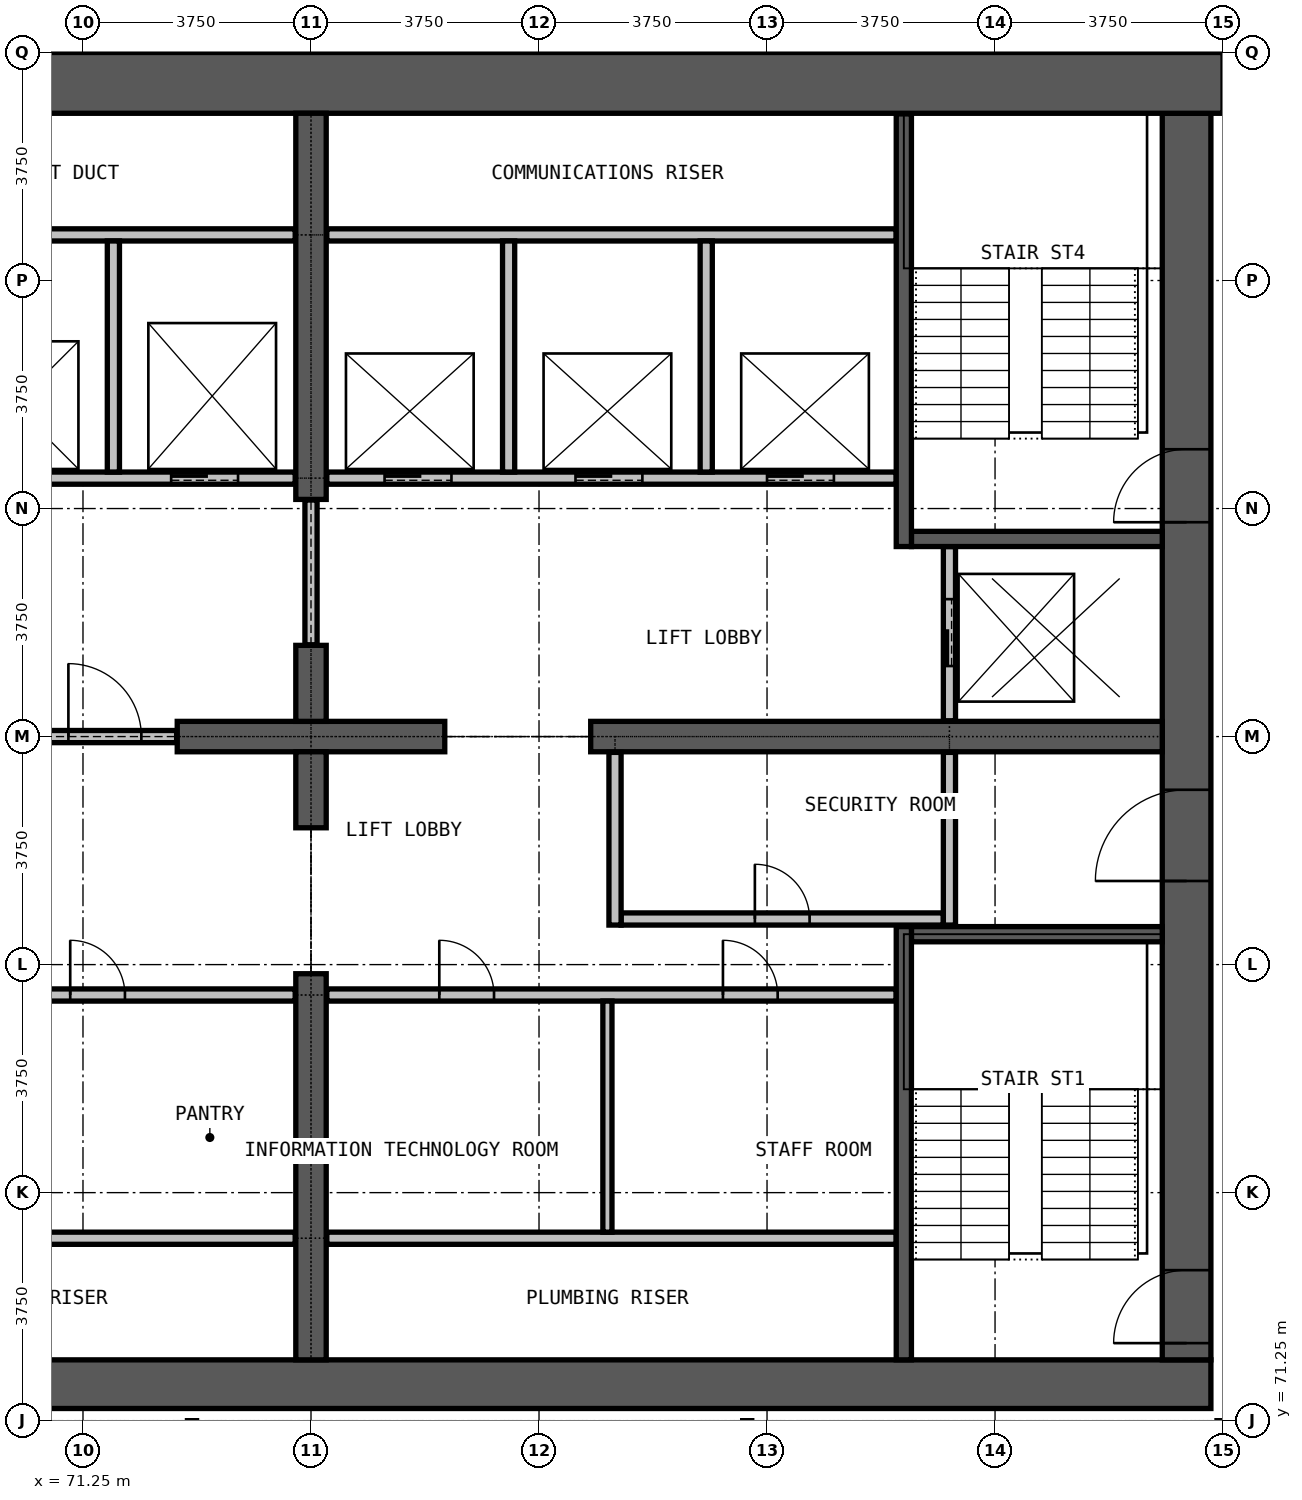
"""IFC4 building model, lengths in metres.
Left out: names, types, materials, properties, quantities, classifications, styles, units other than length and angle.
Written with IfcOpenShell. Run it as: python <this file> out.ifc"""

import sys

from ifc_helpers import new_model, si_unit, direction, frame, frame_2d, origin, place, context, subcontext, project, spatial, rectangle, extrude, element, fill, save


model = new_model("IFC4")
c1 = context("Model", 3, precision=1e-05, world=origin(), true_north=direction((0.0, 1.0)))
c2 = subcontext(c1, "Body", "Model", "MODEL_VIEW")
j1 = project(units=[si_unit("LENGTHUNIT", "METRE"), si_unit("PLANEANGLEUNIT", "RADIAN")], contexts=[c1])
p1 = place(None, origin())
s1 = spatial("IfcSite", under=j1, at=p1, CompositionType="ELEMENT")
p2 = place(p1, origin())
s2 = spatial("IfcBuilding", under=s1, at=p2, CompositionType="ELEMENT")
p3 = place(p2, frame((0.0, 0.0, 154.9)))
s3 = spatial("IfcBuildingStorey", under=s2, at=p3, CompositionType="ELEMENT", Elevation=154.9)
p4 = place(p3, frame((60.2, 71.85, 0.0), z_axis=(0.0, 0.0, 1.0), x_axis=(1.0, 0.0, 0.0)))
e1 = element("IfcWall", 1, at=p4, inside=s3, PredefinedType="SHEAR", context=c2, shape_type="SweptSolid", body=[
    extrude(rectangle(XDim=29.6, YDim=0.8, at=frame_2d((14.8, 0.0))), origin(), (0.0, 0.0, 1.0), 3.6),
])
p5 = place(p3, frame((89.4, 72.25, 0.0), z_axis=(0.0, 0.0, 1.0), x_axis=(0.0, 1.0, 0.0)))
e2 = element("IfcWall", 2, at=p5, inside=s3, PredefinedType="SHEAR", context=c2, shape_type="SweptSolid", body=[
    extrude(rectangle(XDim=20.5, YDim=0.8, at=frame_2d((10.25, 0.0))), origin(), (0.0, 0.0, 1.0), 3.6),
])
p6 = place(p5, frame((0.275, 0.0, 0.0)))
e3 = element("IfcOpeningElement", 3, at=p6, cuts=e2, PredefinedType="OPENING", context=c2, shape_type="SweptSolid", body=[
    extrude(rectangle(XDim=1.2, YDim=2.2, at=frame_2d((0.6, 1.1))), frame((0.0, 0.41, 0.0), z_axis=(0.0, -1.0, 0.0), x_axis=(1.0, 0.0, 0.0)), (0.0, 0.0, 1.0), 0.82),
])
p7 = place(p5, frame((13.775, 0.0, 0.0)))
e4 = element("IfcOpeningElement", 4, at=p7, cuts=e2, PredefinedType="OPENING", context=c2, shape_type="SweptSolid", body=[
    extrude(rectangle(XDim=1.2, YDim=2.2, at=frame_2d((0.6, 1.1))), frame((0.0, 0.41, 0.0), z_axis=(0.0, -1.0, 0.0), x_axis=(1.0, 0.0, 0.0)), (0.0, 0.0, 1.0), 0.82),
])
p8 = place(p5, frame((7.875, 0.0, 0.0)))
e5 = element("IfcOpeningElement", 5, at=p8, cuts=e2, PredefinedType="OPENING", context=c2, shape_type="SweptSolid", body=[
    extrude(rectangle(XDim=1.5, YDim=2.2, at=frame_2d((0.75, 1.1))), frame((0.0, 0.41, 0.0), z_axis=(0.0, -1.0, 0.0), x_axis=(1.0, 0.0, 0.0)), (0.0, 0.0, 1.0), 0.82),
])
p9 = place(p3, frame((90.0, 93.25, 0.0), z_axis=(0.0, 0.0, 1.0), x_axis=(-1.0, 0.0, 0.0)))
e6 = element("IfcWall", 6, at=p9, inside=s3, PredefinedType="SHEAR", context=c2, shape_type="SweptSolid", body=[
    extrude(rectangle(XDim=30.0, YDim=1.0, at=frame_2d((15.0, 0.0))), origin(), (0.0, 0.0, 1.0), 3.6),
])
p10 = place(p3, frame((72.8, 82.5, 0.0), z_axis=(0.0, 0.0, 1.0), x_axis=(1.0, 0.0, 0.0)))
e7 = element("IfcWall", 7, at=p10, inside=s3, PredefinedType="SHEAR", context=c2, shape_type="SweptSolid", body=[
    extrude(rectangle(XDim=4.4, YDim=0.5, at=frame_2d((2.2, 0.0))), origin(), (0.0, 0.0, 1.0), 3.6),
])
p11 = place(p3, frame((79.6, 82.5, 0.0), z_axis=(0.0, 0.0, 1.0), x_axis=(1.0, 0.0, 0.0)))
e8 = element("IfcWall", 8, at=p11, inside=s3, PredefinedType="SHEAR", context=c2, shape_type="SweptSolid", body=[
    extrude(rectangle(XDim=9.4, YDim=0.5, at=frame_2d((4.7, 0.0))), origin(), (0.0, 0.0, 1.0), 3.6),
])
p12 = place(p3, frame((75.0, 72.25, 0.0), z_axis=(0.0, 0.0, 1.0), x_axis=(0.0, 1.0, 0.0)))
e9 = element("IfcWall", 9, at=p12, inside=s3, PredefinedType="SHEAR", context=c2, shape_type="SweptSolid", body=[
    extrude(rectangle(XDim=6.35, YDim=0.5, at=frame_2d((3.175, 0.0))), origin(), (0.0, 0.0, 1.0), 3.6),
])
for number, where, z_axis, x_axis in (
    (10, (75.0, 81.0, 0.0), (0.0, 0.0, 1.0), (0.0, 1.0, 0.0)),
    (11, (75.0, 82.75, 0.0), (0.0, 0.0, 1.0), (0.0, 1.0, 0.0)),
):
    element("IfcWall", number, at=place(p3, frame(where, z_axis=z_axis, x_axis=x_axis)), inside=s3, PredefinedType="SHEAR", context=c2, shape_type="SweptSolid", body=[
        extrude(rectangle(XDim=1.25, YDim=0.5, at=frame_2d((0.625, 0.0))), origin(), (0.0, 0.0, 1.0), 3.6),
    ])
p13 = place(p3, frame((75.0, 86.4, 0.0), z_axis=(0.0, 0.0, 1.0), x_axis=(0.0, 1.0, 0.0)))
e12 = element("IfcWall", 12, at=p13, inside=s3, PredefinedType="SHEAR", context=c2, shape_type="SweptSolid", body=[
    extrude(rectangle(XDim=6.35, YDim=0.5, at=frame_2d((3.175, 0.0))), origin(), (0.0, 0.0, 1.0), 3.6),
])
for number, where, z_axis, x_axis in (
    (13, (65.375, 74.25, 0.0), (0.0, 0.0, 1.0), (1.0, 0.0, 0.0)),
    (14, (75.26, 74.25, 0.0), (0.0, 0.0, 1.0), (1.0, 0.0, 0.0)),
):
    element("IfcWall", number, at=place(p3, frame(where, z_axis=z_axis, x_axis=x_axis)), inside=s3, PredefinedType="PARTITIONING", context=c2, shape_type="SweptSolid", body=[
        extrude(rectangle(XDim=9.365, YDim=0.2, at=frame_2d((4.683, 0.0))), origin(), (0.0, 0.0, 1.0), 3.3),
    ])
p14 = place(p3, frame((65.375, 78.25, 0.0), z_axis=(0.0, 0.0, 1.0), x_axis=(1.0, 0.0, 0.0)))
e15 = element("IfcWall", 15, at=p14, inside=s3, PredefinedType="PARTITIONING", context=c2, shape_type="SweptSolid", body=[
    extrude(rectangle(XDim=9.365, YDim=0.2, at=frame_2d((4.683, 0.0))), origin(), (0.0, 0.0, 1.0), 3.3),
])
p15 = place(p14, frame((1.0, 0.0, 0.0)))
e16 = element("IfcOpeningElement", 16, at=p15, cuts=e15, PredefinedType="OPENING", context=c2, shape_type="SweptSolid", body=[
    extrude(rectangle(XDim=0.9, YDim=2.2, at=frame_2d((0.45, 1.1))), frame((0.0, 0.11, 0.0), z_axis=(0.0, -1.0, 0.0), x_axis=(1.0, 0.0, 0.0)), (0.0, 0.0, 1.0), 0.22),
])
p16 = place(p14, frame((5.665, 0.0, 0.0)))
e17 = element("IfcOpeningElement", 17, at=p16, cuts=e15, PredefinedType="OPENING", context=c2, shape_type="SweptSolid", body=[
    extrude(rectangle(XDim=0.9, YDim=2.2, at=frame_2d((0.45, 1.1))), frame((0.0, 0.11, 0.0), z_axis=(0.0, -1.0, 0.0), x_axis=(1.0, 0.0, 0.0)), (0.0, 0.0, 1.0), 0.22),
])
p17 = place(p3, frame((75.26, 78.25, 0.0), z_axis=(0.0, 0.0, 1.0), x_axis=(1.0, 0.0, 0.0)))
e18 = element("IfcWall", 18, at=p17, inside=s3, PredefinedType="PARTITIONING", context=c2, shape_type="SweptSolid", body=[
    extrude(rectangle(XDim=9.365, YDim=0.2, at=frame_2d((4.683, 0.0))), origin(), (0.0, 0.0, 1.0), 3.3),
])
p18 = place(p17, frame((1.85, 0.0, 0.0)))
e19 = element("IfcOpeningElement", 19, at=p18, cuts=e18, PredefinedType="OPENING", context=c2, shape_type="SweptSolid", body=[
    extrude(rectangle(XDim=0.9, YDim=2.2, at=frame_2d((0.45, 1.1))), frame((0.0, 0.11, 0.0), z_axis=(0.0, -1.0, 0.0), x_axis=(1.0, 0.0, 0.0)), (0.0, 0.0, 1.0), 0.22),
])
p19 = place(p17, frame((6.515, 0.0, 0.0)))
e20 = element("IfcOpeningElement", 20, at=p19, cuts=e18, PredefinedType="OPENING", context=c2, shape_type="SweptSolid", body=[
    extrude(rectangle(XDim=0.9, YDim=2.2, at=frame_2d((0.45, 1.1))), frame((0.0, 0.11, 0.0), z_axis=(0.0, -1.0, 0.0), x_axis=(1.0, 0.0, 0.0)), (0.0, 0.0, 1.0), 0.22),
])
p20 = place(p3, frame((80.1, 79.5, 0.0), z_axis=(0.0, 0.0, 1.0), x_axis=(1.0, 0.0, 0.0)))
e21 = element("IfcWall", 21, at=p20, inside=s3, PredefinedType="PARTITIONING", context=c2, shape_type="SweptSolid", body=[
    extrude(rectangle(XDim=5.3, YDim=0.2, at=frame_2d((2.65, 0.0))), origin(), (0.0, 0.0, 1.0), 3.3),
])
p21 = place(p20, frame((2.2, 0.0, 0.0)))
e22 = element("IfcOpeningElement", 22, at=p21, cuts=e21, PredefinedType="OPENING", context=c2, shape_type="SweptSolid", body=[
    extrude(rectangle(XDim=0.9, YDim=2.2, at=frame_2d((0.45, 1.1))), frame((0.0, 0.11, 0.0), z_axis=(0.0, -1.0, 0.0), x_axis=(1.0, 0.0, 0.0)), (0.0, 0.0, 1.0), 0.22),
])
p22 = place(p3, frame((70.41, 82.5, 0.0), z_axis=(0.0, 0.0, 1.0), x_axis=(1.0, 0.0, 0.0)))
e23 = element("IfcWall", 23, at=p22, inside=s3, PredefinedType="PARTITIONING", context=c2, shape_type="SweptSolid", body=[
    extrude(rectangle(XDim=2.38, YDim=0.2, at=frame_2d((1.19, 0.0))), origin(), (0.0, 0.0, 1.0), 2.4),
])
p23 = place(p22, frame((0.6, 0.0, 0.0)))
e24 = element("IfcOpeningElement", 24, at=p23, cuts=e23, PredefinedType="OPENING", context=c2, shape_type="SweptSolid", body=[
    extrude(rectangle(XDim=1.2, YDim=2.2, at=frame_2d((0.6, 1.1))), frame((0.0, 0.11, 0.0), z_axis=(0.0, -1.0, 0.0), x_axis=(1.0, 0.0, 0.0)), (0.0, 0.0, 1.0), 0.22),
])
p24 = place(p3, frame((75.0, 84.01, 0.0), z_axis=(0.0, 0.0, 1.0), x_axis=(0.0, 1.0, 0.0)))
e25 = element("IfcWall", 25, at=p24, inside=s3, PredefinedType="PARTITIONING", context=c2, shape_type="SweptSolid", body=[
    extrude(rectangle(XDim=2.38, YDim=0.2, at=frame_2d((1.19, 0.0))), origin(), (0.0, 0.0, 1.0), 2.4),
])
for number, where, z_axis, x_axis in (
    (26, (80.0, 79.4, 0.0), (0.0, 0.0, 1.0), (0.0, 1.0, 0.0)),
    (27, (85.5, 79.4, 0.0), (0.0, 0.0, 1.0), (0.0, 1.0, 0.0)),
):
    element("IfcWall", number, at=place(p3, frame(where, z_axis=z_axis, x_axis=x_axis)), inside=s3, PredefinedType="PARTITIONING", context=c2, shape_type="SweptSolid", body=[
        extrude(rectangle(XDim=2.84, YDim=0.2, at=frame_2d((1.42, 0.0))), origin(), (0.0, 0.0, 1.0), 3.3),
    ])
p25 = place(p3, frame((79.875, 74.35, 0.0), z_axis=(0.0, 0.0, 1.0), x_axis=(0.0, 1.0, 0.0)))
e28 = element("IfcWall", 28, at=p25, inside=s3, PredefinedType="PARTITIONING", context=c2, shape_type="SweptSolid", body=[
    extrude(rectangle(XDim=3.8, YDim=0.15, at=frame_2d((1.9, 0.0))), origin(), (0.0, 0.0, 1.0), 3.3),
])
p26 = place(p3, frame((65.375, 86.75, 0.0), z_axis=(0.0, 0.0, 1.0), x_axis=(1.0, 0.0, 0.0)))
e29 = element("IfcWall", 29, at=p26, inside=s3, PredefinedType="PARTITIONING", context=c2, shape_type="SweptSolid", body=[
    extrude(rectangle(XDim=9.365, YDim=0.2, at=frame_2d((4.683, 0.0))), origin(), (0.0, 0.0, 1.0), 3.3),
])
p27 = place(p26, frame((1.0, 0.0, 0.0)))
e30 = element("IfcOpeningElement", 30, at=p27, cuts=e29, PredefinedType="OPENING", context=c2, shape_type="SweptSolid", body=[
    extrude(rectangle(XDim=1.1, YDim=2.2, at=frame_2d((0.55, 1.1))), frame((0.0, 0.11, 0.0), z_axis=(0.0, -1.0, 0.0), x_axis=(1.0, 0.0, 0.0)), (0.0, 0.0, 1.0), 0.22),
])
p28 = place(p26, frame((4.175, 0.0, 0.0)))
e31 = element("IfcOpeningElement", 31, at=p28, cuts=e29, PredefinedType="OPENING", context=c2, shape_type="SweptSolid", body=[
    extrude(rectangle(XDim=1.1, YDim=2.2, at=frame_2d((0.55, 1.1))), frame((0.0, 0.11, 0.0), z_axis=(0.0, -1.0, 0.0), x_axis=(1.0, 0.0, 0.0)), (0.0, 0.0, 1.0), 0.22),
])
p29 = place(p26, frame((7.325, 0.0, 0.0)))
e32 = element("IfcOpeningElement", 32, at=p29, cuts=e29, PredefinedType="OPENING", context=c2, shape_type="SweptSolid", body=[
    extrude(rectangle(XDim=1.1, YDim=2.2, at=frame_2d((0.55, 1.1))), frame((0.0, 0.11, 0.0), z_axis=(0.0, -1.0, 0.0), x_axis=(1.0, 0.0, 0.0)), (0.0, 0.0, 1.0), 0.22),
])
p30 = place(p3, frame((75.26, 86.75, 0.0), z_axis=(0.0, 0.0, 1.0), x_axis=(1.0, 0.0, 0.0)))
e33 = element("IfcWall", 33, at=p30, inside=s3, PredefinedType="PARTITIONING", context=c2, shape_type="SweptSolid", body=[
    extrude(rectangle(XDim=9.365, YDim=0.2, at=frame_2d((4.683, 0.0))), origin(), (0.0, 0.0, 1.0), 3.3),
])
p31 = place(p30, frame((0.95, 0.0, 0.0)))
e34 = element("IfcOpeningElement", 34, at=p31, cuts=e33, PredefinedType="OPENING", context=c2, shape_type="SweptSolid", body=[
    extrude(rectangle(XDim=1.1, YDim=2.2, at=frame_2d((0.55, 1.1))), frame((0.0, 0.11, 0.0), z_axis=(0.0, -1.0, 0.0), x_axis=(1.0, 0.0, 0.0)), (0.0, 0.0, 1.0), 0.22),
])
p32 = place(p30, frame((4.09, 0.0, 0.0)))
e35 = element("IfcOpeningElement", 35, at=p32, cuts=e33, PredefinedType="OPENING", context=c2, shape_type="SweptSolid", body=[
    extrude(rectangle(XDim=1.1, YDim=2.2, at=frame_2d((0.55, 1.1))), frame((0.0, 0.11, 0.0), z_axis=(0.0, -1.0, 0.0), x_axis=(1.0, 0.0, 0.0)), (0.0, 0.0, 1.0), 0.22),
])
p33 = place(p30, frame((7.24, 0.0, 0.0)))
e36 = element("IfcOpeningElement", 36, at=p33, cuts=e33, PredefinedType="OPENING", context=c2, shape_type="SweptSolid", body=[
    extrude(rectangle(XDim=1.1, YDim=2.2, at=frame_2d((0.55, 1.1))), frame((0.0, 0.11, 0.0), z_axis=(0.0, -1.0, 0.0), x_axis=(1.0, 0.0, 0.0)), (0.0, 0.0, 1.0), 0.22),
])
for number, where, z_axis, x_axis in (
    (37, (65.375, 90.75, 0.0), (0.0, 0.0, 1.0), (1.0, 0.0, 0.0)),
    (38, (75.26, 90.75, 0.0), (0.0, 0.0, 1.0), (1.0, 0.0, 0.0)),
):
    element("IfcWall", number, at=place(p3, frame(where, z_axis=z_axis, x_axis=x_axis)), inside=s3, PredefinedType="PARTITIONING", context=c2, shape_type="SweptSolid", body=[
        extrude(rectangle(XDim=9.365, YDim=0.2, at=frame_2d((4.683, 0.0))), origin(), (0.0, 0.0, 1.0), 3.3),
    ])
for number, where, z_axis, x_axis in (
    (39, (71.75, 86.85, 0.0), (0.0, 0.0, 1.0), (0.0, 1.0, 0.0)),
    (40, (78.25, 86.85, 0.0), (0.0, 0.0, 1.0), (0.0, 1.0, 0.0)),
    (41, (81.5, 86.85, 0.0), (0.0, 0.0, 1.0), (0.0, 1.0, 0.0)),
):
    element("IfcWall", number, at=place(p3, frame(where, z_axis=z_axis, x_axis=x_axis)), inside=s3, PredefinedType="PARTITIONING", context=c2, shape_type="SweptSolid", body=[
        extrude(rectangle(XDim=3.8, YDim=0.2, at=frame_2d((1.9, 0.0))), origin(), (0.0, 0.0, 1.0), 3.3),
    ])
p34 = place(p3, frame((85.5, 82.76, 0.0), z_axis=(0.0, 0.0, 1.0), x_axis=(0.0, 1.0, 0.0)))
e42 = element("IfcWall", 42, at=p34, inside=s3, PredefinedType="PARTITIONING", context=c2, shape_type="SweptSolid", body=[
    extrude(rectangle(XDim=2.865, YDim=0.2, at=frame_2d((1.433, 0.0))), origin(), (0.0, 0.0, 1.0), 3.3),
])
p35 = place(p34, frame((0.9, 0.0, 0.0)))
e43 = element("IfcOpeningElement", 43, at=p35, cuts=e42, PredefinedType="OPENING", context=c2, shape_type="SweptSolid", body=[
    extrude(rectangle(XDim=1.1, YDim=2.2, at=frame_2d((0.55, 1.1))), frame((0.0, 0.11, 0.0), z_axis=(0.0, -1.0, 0.0), x_axis=(1.0, 0.0, 0.0)), (0.0, 0.0, 1.0), 0.22),
])
for number, where, z_axis, x_axis in (
    (44, (84.875, 79.25, 0.0), (0.0, 0.0, 1.0), (1.0, 0.0, 0.0)),
    (45, (84.875, 85.75, 0.0), (0.0, 0.0, 1.0), (1.0, 0.0, 0.0)),
):
    element("IfcWall", number, at=place(p3, frame(where, z_axis=z_axis, x_axis=x_axis)), inside=s3, PredefinedType="PARTITIONING", context=c2, shape_type="SweptSolid", body=[
        extrude(rectangle(XDim=4.125, YDim=0.25, at=frame_2d((2.062, 0.0))), origin(), (0.0, 0.0, 1.0), 3.3),
    ])
p36 = place(p3, frame((84.75, 72.25, 0.0), z_axis=(0.0, 0.0, 1.0), x_axis=(0.0, 1.0, 0.0)))
e46 = element("IfcWall", 46, at=p36, inside=s3, PredefinedType="PARTITIONING", context=c2, shape_type="SweptSolid", body=[
    extrude(rectangle(XDim=7.125, YDim=0.25, at=frame_2d((3.562, 0.0))), origin(), (0.0, 0.0, 1.0), 3.3),
])
p37 = place(p3, frame((84.75, 85.625, 0.0), z_axis=(0.0, 0.0, 1.0), x_axis=(0.0, 1.0, 0.0)))
e47 = element("IfcWall", 47, at=p37, inside=s3, PredefinedType="PARTITIONING", context=c2, shape_type="SweptSolid", body=[
    extrude(rectangle(XDim=7.115, YDim=0.25, at=frame_2d((3.558, 0.0))), origin(), (0.0, 0.0, 1.0), 3.3),
])
p38 = place(p31, origin())
e48 = element("IfcDoor", 48, at=p38, inside=s3, OperationType="DOUBLE_DOOR_SLIDING", PredefinedType="DOOR", context=c2, shape_type="SweptSolid", body=[
    extrude(rectangle(XDim=1.1, YDim=2.2, at=frame_2d((0.55, 1.1))), frame((0.0, 0.025, 0.0), z_axis=(0.0, -1.0, 0.0), x_axis=(1.0, 0.0, 0.0)), (0.0, 0.0, 1.0), 0.05),
])
fill(e34, e48)
p39 = place(p32, origin())
e49 = element("IfcDoor", 49, at=p39, inside=s3, OperationType="DOUBLE_DOOR_SLIDING", PredefinedType="DOOR", context=c2, shape_type="SweptSolid", body=[
    extrude(rectangle(XDim=1.1, YDim=2.2, at=frame_2d((0.55, 1.1))), frame((0.0, 0.025, 0.0), z_axis=(0.0, -1.0, 0.0), x_axis=(1.0, 0.0, 0.0)), (0.0, 0.0, 1.0), 0.05),
])
fill(e35, e49)
p40 = place(p33, origin())
e50 = element("IfcDoor", 50, at=p40, inside=s3, OperationType="DOUBLE_DOOR_SLIDING", PredefinedType="DOOR", context=c2, shape_type="SweptSolid", body=[
    extrude(rectangle(XDim=1.1, YDim=2.2, at=frame_2d((0.55, 1.1))), frame((0.0, 0.025, 0.0), z_axis=(0.0, -1.0, 0.0), x_axis=(1.0, 0.0, 0.0)), (0.0, 0.0, 1.0), 0.05),
])
fill(e36, e50)
p41 = place(p29, origin())
e51 = element("IfcDoor", 51, at=p41, inside=s3, OperationType="DOUBLE_DOOR_SLIDING", PredefinedType="DOOR", context=c2, shape_type="SweptSolid", body=[
    extrude(rectangle(XDim=1.1, YDim=2.2, at=frame_2d((0.55, 1.1))), frame((0.0, 0.025, 0.0), z_axis=(0.0, -1.0, 0.0), x_axis=(1.0, 0.0, 0.0)), (0.0, 0.0, 1.0), 0.05),
])
fill(e32, e51)
p42 = place(p35, origin())
e52 = element("IfcDoor", 52, at=p42, inside=s3, OperationType="DOUBLE_DOOR_SLIDING", PredefinedType="DOOR", context=c2, shape_type="SweptSolid", body=[
    extrude(rectangle(XDim=1.1, YDim=2.2, at=frame_2d((0.55, 1.1))), frame((0.0, 0.025, 0.0), z_axis=(0.0, -1.0, 0.0), x_axis=(1.0, 0.0, 0.0)), (0.0, 0.0, 1.0), 0.05),
])
fill(e43, e52)
p43 = place(p23, origin())
e53 = element("IfcDoor", 53, at=p43, inside=s3, OperationType="SINGLE_SWING_RIGHT", PredefinedType="DOOR", context=c2, shape_type="SweptSolid", body=[
    extrude(rectangle(XDim=1.2, YDim=2.2, at=frame_2d((0.6, 1.1))), frame((0.0, 0.025, 0.0), z_axis=(0.0, -1.0, 0.0), x_axis=(1.0, 0.0, 0.0)), (0.0, 0.0, 1.0), 0.05),
])
fill(e24, e53)
p44 = place(p6, origin())
e54 = element("IfcDoor", 54, at=p44, inside=s3, OperationType="SINGLE_SWING_LEFT", PredefinedType="DOOR", context=c2, shape_type="SweptSolid", body=[
    extrude(rectangle(XDim=1.2, YDim=2.2, at=frame_2d((0.6, 1.1))), frame((0.0, 0.025, 0.0), z_axis=(0.0, -1.0, 0.0), x_axis=(1.0, 0.0, 0.0)), (0.0, 0.0, 1.0), 0.05),
])
fill(e3, e54)
p45 = place(p7, origin())
e55 = element("IfcDoor", 55, at=p45, inside=s3, OperationType="SINGLE_SWING_LEFT", PredefinedType="DOOR", context=c2, shape_type="SweptSolid", body=[
    extrude(rectangle(XDim=1.2, YDim=2.2, at=frame_2d((0.6, 1.1))), frame((0.0, 0.025, 0.0), z_axis=(0.0, -1.0, 0.0), x_axis=(1.0, 0.0, 0.0)), (0.0, 0.0, 1.0), 0.05),
])
fill(e4, e55)
p46 = place(p8, origin())
e56 = element("IfcDoor", 56, at=p46, inside=s3, OperationType="DOUBLE_DOOR_SINGLE_SWING", PredefinedType="DOOR", context=c2, shape_type="SweptSolid", body=[
    extrude(rectangle(XDim=1.5, YDim=2.2, at=frame_2d((0.75, 1.1))), frame((0.0, 0.025, 0.0), z_axis=(0.0, -1.0, 0.0), x_axis=(1.0, 0.0, 0.0)), (0.0, 0.0, 1.0), 0.05),
])
fill(e5, e56)
p47 = place(p21, origin())
e57 = element("IfcDoor", 57, at=p47, inside=s3, OperationType="SINGLE_SWING_LEFT", PredefinedType="DOOR", context=c2, shape_type="SweptSolid", body=[
    extrude(rectangle(XDim=0.9, YDim=2.2, at=frame_2d((0.45, 1.1))), frame((0.0, 0.025, 0.0), z_axis=(0.0, -1.0, 0.0), x_axis=(1.0, 0.0, 0.0)), (0.0, 0.0, 1.0), 0.05),
])
fill(e22, e57)
p48 = place(p16, origin())
e58 = element("IfcDoor", 58, at=p48, inside=s3, OperationType="SINGLE_SWING_LEFT", PredefinedType="DOOR", context=c2, shape_type="SweptSolid", body=[
    extrude(rectangle(XDim=0.9, YDim=2.2, at=frame_2d((0.45, 1.1))), frame((0.0, 0.025, 0.0), z_axis=(0.0, -1.0, 0.0), x_axis=(1.0, 0.0, 0.0)), (0.0, 0.0, 1.0), 0.05),
])
fill(e17, e58)
p49 = place(p18, origin())
e59 = element("IfcDoor", 59, at=p49, inside=s3, OperationType="SINGLE_SWING_LEFT", PredefinedType="DOOR", context=c2, shape_type="SweptSolid", body=[
    extrude(rectangle(XDim=0.9, YDim=2.2, at=frame_2d((0.45, 1.1))), frame((0.0, 0.025, 0.0), z_axis=(0.0, -1.0, 0.0), x_axis=(1.0, 0.0, 0.0)), (0.0, 0.0, 1.0), 0.05),
])
fill(e19, e59)
p50 = place(p19, origin())
e60 = element("IfcDoor", 60, at=p50, inside=s3, OperationType="SINGLE_SWING_LEFT", PredefinedType="DOOR", context=c2, shape_type="SweptSolid", body=[
    extrude(rectangle(XDim=0.9, YDim=2.2, at=frame_2d((0.45, 1.1))), frame((0.0, 0.025, 0.0), z_axis=(0.0, -1.0, 0.0), x_axis=(1.0, 0.0, 0.0)), (0.0, 0.0, 1.0), 0.05),
])
fill(e20, e60)
save(model, sys.argv[1])
